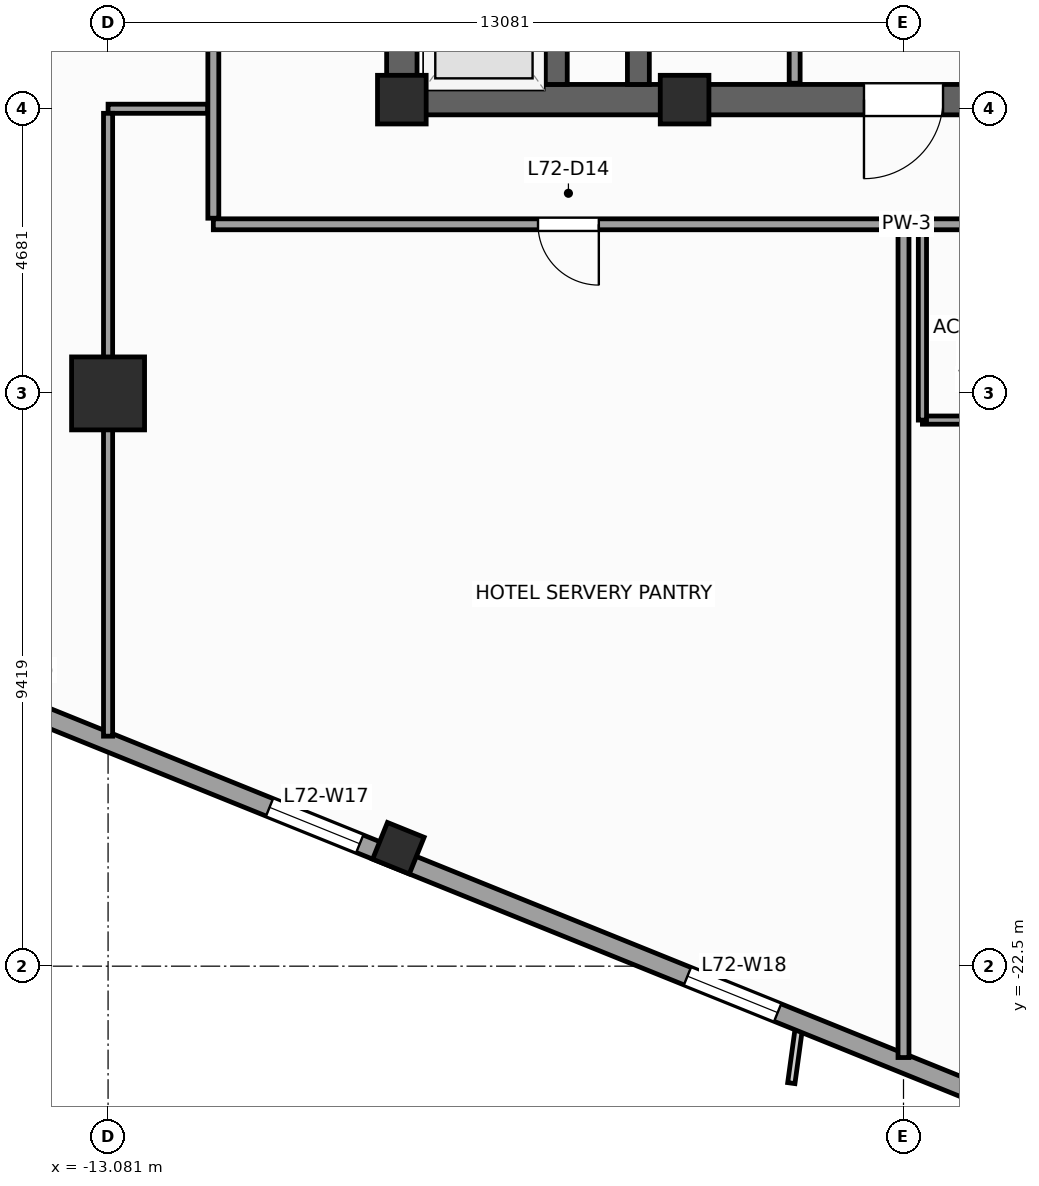
"""IFC4 building model, lengths in metres.
Left out: names, types, materials, properties, quantities, classifications, styles, units other than length and angle.
Written with IfcOpenShell. Run it as: python <this file> out.ifc"""

import sys

from ifc_helpers import new_model, si_unit, direction, frame, frame_2d, origin, origin_2d, place, context, subcontext, project, spatial, rectangle, extrude, source, transform, mapped, element, fill, save


model = new_model("IFC4")
c1 = context("Model", 3, precision=1e-05, world=origin(), true_north=direction((0.0, 1.0)))
c2 = subcontext(c1, "Body", "Model", "MODEL_VIEW")
j1 = project(units=[si_unit("LENGTHUNIT", "METRE"), si_unit("PLANEANGLEUNIT", "RADIAN")], contexts=[c1])
p1 = place(None, origin())
s1 = spatial("IfcSite", under=j1, at=p1, CompositionType="ELEMENT")
p2 = place(p1, origin())
s2 = spatial("IfcBuilding", under=s1, at=p2, CompositionType="ELEMENT")
p3 = place(p2, frame((0.0, 0.0, 294.0)))
s3 = spatial("IfcBuildingStorey", under=s2, at=p3, CompositionType="ELEMENT", Elevation=294.0)
p4 = place(p3, frame((-8.5, -8.25, 0.0), z_axis=(0.0, 0.0, 1.0), x_axis=(1.0, 0.0, 0.0)))
e1 = element("IfcWall", 1, at=p4, inside=s3, PredefinedType="SHEAR", context=c2, shape_type="SweptSolid", body=[
    extrude(rectangle(XDim=17.0, YDim=0.5, at=frame_2d((8.5, 0.0))), origin(), (0.0, 0.0, 1.0), 3.6),
])
p5 = place(p4, frame((7.85, 0.0, 0.0)))
e2 = element("IfcOpeningElement", 2, at=p5, cuts=e1, PredefinedType="OPENING", context=c2, shape_type="SweptSolid", body=[
    extrude(rectangle(XDim=1.3, YDim=2.2, at=frame_2d((0.65, 1.1))), frame((0.0, 0.26, 0.0), z_axis=(0.0, -1.0, 0.0), x_axis=(1.0, 0.0, 0.0)), (0.0, 0.0, 1.0), 0.52),
])
p6 = place(p3, frame((-8.25, -8.0, 0.0), z_axis=(0.0, 0.0, 1.0), x_axis=(0.0, 1.0, 0.0)))
e3 = element("IfcWall", 3, at=p6, inside=s3, PredefinedType="SHEAR", context=c2, shape_type="SweptSolid", body=[
    extrude(rectangle(XDim=16.0, YDim=0.5, at=frame_2d((8.0, 0.0))), origin(), (0.0, 0.0, 1.0), 3.6),
])
p7 = place(p6, frame((4.69, 0.0, 0.0)))
e4 = element("IfcOpeningElement", 4, at=p7, cuts=e3, PredefinedType="OPENING", context=c2, shape_type="SweptSolid", body=[
    extrude(rectangle(XDim=1.3, YDim=2.2, at=frame_2d((0.65, 1.1))), frame((0.0, 0.26, 0.0), z_axis=(0.0, -1.0, 0.0), x_axis=(1.0, 0.0, 0.0)), (0.0, 0.0, 1.0), 0.52),
])
p8 = place(p3, frame((-4.36, -8.0, 0.0), z_axis=(0.0, 0.0, 1.0), x_axis=(0.0, 1.0, 0.0)))
e5 = element("IfcWall", 5, at=p8, inside=s3, PredefinedType="SHEAR", context=c2, shape_type="SweptSolid", body=[
    extrude(rectangle(XDim=16.0, YDim=0.36, at=frame_2d((8.0, 0.0))), origin(), (0.0, 0.0, 1.0), 3.6),
])
p9 = place(p3, frame((-5.71, -8.0, 0.0), z_axis=(0.0, 0.0, 1.0), x_axis=(0.0, 1.0, 0.0)))
e6 = element("IfcWall", 6, at=p9, inside=s3, PredefinedType="SHEAR", context=c2, shape_type="SweptSolid", body=[
    extrude(rectangle(XDim=2.54, YDim=0.36, at=frame_2d((1.27, 0.0))), origin(), (0.0, 0.0, 1.0), 3.6),
])
m1 = source(origin(), c2, "Body", "SweptSolid", [
    extrude(rectangle(XDim=0.8, YDim=0.8, at=origin_2d()), origin(), (0.0, 0.0, 1.0), 3.6),
])
for number, where, z_axis, x_axis in (
    (7, (-8.25, -8.25, 0.0), (0.0, 0.0, 1.0), (1.0, 0.0, 0.0)),
    (8, (-3.6, -8.25, 0.0), (0.0, 0.0, 1.0), (1.0, 0.0, 0.0)),
):
    element("IfcColumn", number, at=place(p3, frame(where, z_axis=z_axis, x_axis=x_axis)), inside=s3, PredefinedType="PILASTER", context=c2, shape_type="MappedRepresentation", body=[
        mapped(m1, transform((0.0, 0.0, 0.0), scale=1.0)),
    ])
m2 = source(origin(), c2, "Body", "SweptSolid", [
    extrude(rectangle(XDim=1.2, YDim=1.2, at=origin_2d()), origin(), (0.0, 0.0, 1.0), 3.6),
])
p10 = place(p3, frame((-13.081, -13.081, 0.0), z_axis=(0.0, 0.0, 1.0), x_axis=(1.0, 0.0, 0.0)))
e9 = element("IfcColumn", 9, at=p10, inside=s3, PredefinedType="COLUMN", context=c2, shape_type="MappedRepresentation", body=[
    mapped(m2, transform((0.0, 0.0, 0.0), scale=1.0)),
])
m3 = source(origin(), c2, "Body", "SweptSolid", [
    extrude(rectangle(XDim=0.65, YDim=0.65, at=origin_2d()), origin(), (0.0, 0.0, 1.0), 3.6),
])
p11 = place(p3, frame((-8.307, -20.56, 0.0), z_axis=(0.0, 0.0, 1.0), x_axis=(0.374606593416, 0.927183854567, 0.0)))
e10 = element("IfcColumn", 10, at=p11, inside=s3, PredefinedType="COLUMN", context=c2, shape_type="MappedRepresentation", body=[
    mapped(m3, transform((0.0, 0.0, 0.0), scale=1.0)),
])
p12 = place(p3, frame((-23.813, -14.479, 0.0), z_axis=(0.0, 0.0, 1.0), x_axis=(0.927182657188, -0.374609557019, 0.0)))
e11 = element("IfcWall", 11, at=p12, inside=s3, PredefinedType="STANDARD", context=c2, shape_type="SweptSolid", body=[
    extrude(rectangle(XDim=33.31, YDim=0.31, at=frame_2d((16.655, 0.0))), origin(), (0.0, 0.0, 1.0), 2.75),
])
p13 = place(p12, frame((3.197, 0.0, 0.47)))
e12 = element("IfcOpeningElement", 12, at=p13, cuts=e11, PredefinedType="OPENING", context=c2, shape_type="SweptSolid", body=[
    extrude(rectangle(XDim=1.6, YDim=2.1, at=frame_2d((0.8, 1.05))), frame((0.0, 0.165, 0.0), z_axis=(0.0, -1.0, 0.0), x_axis=(1.0, 0.0, 0.0)), (0.0, 0.0, 1.0), 0.33),
])
p14 = place(p12, frame((8.86, 0.0, 0.47)))
e13 = element("IfcOpeningElement", 13, at=p14, cuts=e11, PredefinedType="OPENING", context=c2, shape_type="SweptSolid", body=[
    extrude(rectangle(XDim=1.6, YDim=2.1, at=frame_2d((0.8, 1.05))), frame((0.0, 0.165, 0.0), z_axis=(0.0, -1.0, 0.0), x_axis=(1.0, 0.0, 0.0)), (0.0, 0.0, 1.0), 0.33),
])
p15 = place(p12, frame((14.439, 0.0, 0.47)))
e14 = element("IfcOpeningElement", 14, at=p15, cuts=e11, PredefinedType="OPENING", context=c2, shape_type="SweptSolid", body=[
    extrude(rectangle(XDim=1.6, YDim=2.1, at=frame_2d((0.8, 1.05))), frame((0.0, 0.165, 0.0), z_axis=(0.0, -1.0, 0.0), x_axis=(1.0, 0.0, 0.0)), (0.0, 0.0, 1.0), 0.33),
])
p16 = place(p12, frame((21.851, 0.0, 0.47)))
e15 = element("IfcOpeningElement", 15, at=p16, cuts=e11, PredefinedType="OPENING", context=c2, shape_type="SweptSolid", body=[
    extrude(rectangle(XDim=1.6, YDim=2.1, at=frame_2d((0.8, 1.05))), frame((0.0, 0.165, 0.0), z_axis=(0.0, -1.0, 0.0), x_axis=(1.0, 0.0, 0.0)), (0.0, 0.0, 1.0), 0.33),
])
p17 = place(p12, frame((27.847, 0.0, 0.47)))
e16 = element("IfcOpeningElement", 16, at=p17, cuts=e11, PredefinedType="OPENING", context=c2, shape_type="SweptSolid", body=[
    extrude(rectangle(XDim=1.6, YDim=2.1, at=frame_2d((0.8, 1.05))), frame((0.0, 0.165, 0.0), z_axis=(0.0, -1.0, 0.0), x_axis=(1.0, 0.0, 0.0)), (0.0, 0.0, 1.0), 0.33),
])
p18 = place(p3, frame((-1.79, -7.98, 0.0), z_axis=(0.0, 0.0, 1.0), x_axis=(0.0, 1.0, 0.0)))
e17 = element("IfcWall", 17, at=p18, inside=s3, PredefinedType="PARTITIONING", context=c2, shape_type="SweptSolid", body=[
    extrude(rectangle(XDim=12.38, YDim=0.18, at=frame_2d((6.19, 0.0))), origin(), (0.0, 0.0, 1.0), 3.35),
])
p19 = place(p18, frame((8.8, 0.0, 0.0)))
e18 = element("IfcOpeningElement", 18, at=p19, cuts=e17, PredefinedType="OPENING", context=c2, shape_type="SweptSolid", body=[
    extrude(rectangle(XDim=1.1, YDim=2.2, at=frame_2d((0.55, 1.1))), frame((0.0, 0.1, 0.0), z_axis=(0.0, -1.0, 0.0), x_axis=(1.0, 0.0, 0.0)), (0.0, 0.0, 1.0), 0.2),
])
p20 = place(p18, frame((10.86, 0.0, 0.0)))
e19 = element("IfcOpeningElement", 19, at=p20, cuts=e17, PredefinedType="OPENING", context=c2, shape_type="SweptSolid", body=[
    extrude(rectangle(XDim=1.1, YDim=2.2, at=frame_2d((0.55, 1.1))), frame((0.0, 0.1, 0.0), z_axis=(0.0, -1.0, 0.0), x_axis=(1.0, 0.0, 0.0)), (0.0, 0.0, 1.0), 0.2),
])
p21 = place(p18, frame((1.4, 0.0, 0.0)))
e20 = element("IfcOpeningElement", 20, at=p21, cuts=e17, PredefinedType="OPENING", context=c2, shape_type="SweptSolid", body=[
    extrude(rectangle(XDim=1.15, YDim=2.25, at=frame_2d((0.575, 1.125))), frame((0.0, 0.1, 0.0), z_axis=(0.0, -1.0, 0.0), x_axis=(1.0, 0.0, 0.0)), (0.0, 0.0, 1.0), 0.2),
])
p22 = place(p18, frame((5.6, 0.0, 0.0)))
e21 = element("IfcOpeningElement", 21, at=p22, cuts=e17, PredefinedType="OPENING", context=c2, shape_type="SweptSolid", body=[
    extrude(rectangle(XDim=1.15, YDim=2.25, at=frame_2d((0.575, 1.125))), frame((0.0, 0.1, 0.0), z_axis=(0.0, -1.0, 0.0), x_axis=(1.0, 0.0, 0.0)), (0.0, 0.0, 1.0), 0.2),
])
p23 = place(p3, frame((-11.35, -10.3, 0.0), z_axis=(0.0, 0.0, 1.0), x_axis=(1.0, 0.0, 0.0)))
e22 = element("IfcWall", 22, at=p23, inside=s3, PredefinedType="PARTITIONING", context=c2, shape_type="SweptSolid", body=[
    extrude(rectangle(XDim=22.8, YDim=0.18, at=frame_2d((11.4, 0.0))), origin(), (0.0, 0.0, 1.0), 3.35),
])
p24 = place(p23, frame((12.336, 0.0, 0.0)))
e23 = element("IfcOpeningElement", 23, at=p24, cuts=e22, PredefinedType="OPENING", context=c2, shape_type="SweptSolid", body=[
    extrude(rectangle(XDim=0.95, YDim=2.1, at=frame_2d((0.475, 1.05))), frame((0.0, 0.1, 0.0), z_axis=(0.0, -1.0, 0.0), x_axis=(1.0, 0.0, 0.0)), (0.0, 0.0, 1.0), 0.2),
])
p25 = place(p23, frame((17.71, 0.0, 0.0)))
e24 = element("IfcOpeningElement", 24, at=p25, cuts=e22, PredefinedType="OPENING", context=c2, shape_type="SweptSolid", body=[
    extrude(rectangle(XDim=1.0, YDim=2.15, at=frame_2d((0.5, 1.075))), frame((0.0, 0.1, 0.0), z_axis=(0.0, -1.0, 0.0), x_axis=(1.0, 0.0, 0.0)), (0.0, 0.0, 1.0), 0.2),
])
p26 = place(p23, frame((5.339, 0.0, 0.0)))
e25 = element("IfcOpeningElement", 25, at=p26, cuts=e22, PredefinedType="OPENING", context=c2, shape_type="SweptSolid", body=[
    extrude(rectangle(XDim=1.0, YDim=2.15, at=frame_2d((0.5, 1.075))), frame((0.0, 0.1, 0.0), z_axis=(0.0, -1.0, 0.0), x_axis=(1.0, 0.0, 0.0)), (0.0, 0.0, 1.0), 0.2),
])
p27 = place(p3, frame((-11.35, -10.2, 0.0), z_axis=(0.0, 0.0, 1.0), x_axis=(0.0, 1.0, 0.0)))
e26 = element("IfcWall", 26, at=p27, inside=s3, PredefinedType="PARTITIONING", context=c2, shape_type="SweptSolid", body=[
    extrude(rectangle(XDim=22.55, YDim=0.18, at=frame_2d((11.275, 0.0))), origin(), (0.0, 0.0, 1.0), 3.35),
])
p28 = place(p27, frame((11.6, 0.0, 0.0)))
e27 = element("IfcOpeningElement", 27, at=p28, cuts=e26, PredefinedType="OPENING", context=c2, shape_type="SweptSolid", body=[
    extrude(rectangle(XDim=1.0, YDim=2.15, at=frame_2d((0.5, 1.075))), frame((0.0, 0.1, 0.0), z_axis=(0.0, -1.0, 0.0), x_axis=(1.0, 0.0, 0.0)), (0.0, 0.0, 1.0), 0.2),
])
p29 = place(p27, frame((15.8, 0.0, 0.0)))
e28 = element("IfcOpeningElement", 28, at=p29, cuts=e26, PredefinedType="OPENING", context=c2, shape_type="SweptSolid", body=[
    extrude(rectangle(XDim=1.0, YDim=2.15, at=frame_2d((0.5, 1.075))), frame((0.0, 0.1, 0.0), z_axis=(0.0, -1.0, 0.0), x_axis=(1.0, 0.0, 0.0)), (0.0, 0.0, 1.0), 0.2),
])
p30 = place(p27, frame((3.6, 0.0, 0.0)))
e29 = element("IfcOpeningElement", 29, at=p30, cuts=e26, PredefinedType="OPENING", context=c2, shape_type="SweptSolid", body=[
    extrude(rectangle(XDim=1.0, YDim=2.15, at=frame_2d((0.5, 1.075))), frame((0.0, 0.1, 0.0), z_axis=(0.0, -1.0, 0.0), x_axis=(1.0, 0.0, 0.0)), (0.0, 0.0, 1.0), 0.2),
])
p31 = place(p27, frame((7.8, 0.0, 0.0)))
e30 = element("IfcOpeningElement", 30, at=p31, cuts=e26, PredefinedType="OPENING", context=c2, shape_type="SweptSolid", body=[
    extrude(rectangle(XDim=1.0, YDim=2.15, at=frame_2d((0.5, 1.075))), frame((0.0, 0.1, 0.0), z_axis=(0.0, -1.0, 0.0), x_axis=(1.0, 0.0, 0.0)), (0.0, 0.0, 1.0), 0.2),
])
p32 = place(p3, frame((0.0, -10.395, 0.0), z_axis=(0.0, 0.0, 1.0), x_axis=(0.0, -1.0, 0.0)))
e31 = element("IfcWall", 31, at=p32, inside=s3, PredefinedType="PARTITIONING", context=c2, shape_type="SweptSolid", body=[
    extrude(rectangle(XDim=13.608, YDim=0.18, at=frame_2d((6.804, 0.0))), origin(), (0.0, 0.0, 1.0), 3.02),
])
p33 = place(p3, frame((-11.445, -8.4, 0.0), z_axis=(0.0, 0.0, 1.0), x_axis=(-1.0, 0.0, 0.0)))
e32 = element("IfcWall", 32, at=p33, inside=s3, PredefinedType="PARTITIONING", context=c2, shape_type="SweptSolid", body=[
    extrude(rectangle(XDim=1.636, YDim=0.15, at=frame_2d((0.818, 0.0))), origin(), (0.0, 0.0, 1.0), 3.35),
])
p34 = place(p3, frame((-13.081, -8.475, 0.0), z_axis=(0.0, 0.0, 1.0), x_axis=(0.0, -1.0, 0.0)))
e33 = element("IfcWall", 33, at=p34, inside=s3, PredefinedType="PARTITIONING", context=c2, shape_type="SweptSolid", body=[
    extrude(rectangle(XDim=10.243, YDim=0.15, at=frame_2d((5.121, 0.0))), origin(), (0.0, 0.0, 1.0), 2.45),
])
p35 = place(p3, frame((0.311, -13.52, 0.0), z_axis=(0.0, 0.0, 1.0), x_axis=(1.0, 0.0, 0.0)))
e34 = element("IfcWall", 34, at=p35, inside=s3, PredefinedType="PARTITIONING", context=c2, shape_type="SweptSolid", body=[
    extrude(rectangle(XDim=2.3, YDim=0.135, at=frame_2d((1.15, 0.0))), origin(), (0.0, 0.0, 1.0), 3.35),
])
p36 = place(p3, frame((0.311, -13.52, 0.0), z_axis=(0.0, 0.0, 1.0), x_axis=(0.0, 1.0, 0.0)))
e35 = element("IfcWall", 35, at=p36, inside=s3, PredefinedType="PARTITIONING", context=c2, shape_type="SweptSolid", body=[
    extrude(rectangle(XDim=3.2, YDim=0.135, at=frame_2d((1.6, 0.0))), origin(), (0.0, 0.0, 1.0), 3.35),
])
m4 = source(origin(), c2, "Body", "SweptSolid", [
    extrude(rectangle(XDim=1.6, YDim=2.1, at=frame_2d((0.8, 1.05))), frame((0.0, 0.03, 0.0), z_axis=(0.0, -1.0, 0.0), x_axis=(1.0, 0.0, 0.0)), (0.0, 0.0, 1.0), 0.06),
])
p37 = place(p15, origin())
e36 = element("IfcWindow", 36, at=p37, inside=s3, PartitioningType="SINGLE_PANEL", PredefinedType="WINDOW", context=c2, shape_type="MappedRepresentation", body=[
    mapped(m4, transform((0.0, 0.0, 0.0), scale=1.0)),
])
fill(e14, e36)
p38 = place(p16, origin())
e37 = element("IfcWindow", 37, at=p38, inside=s3, PartitioningType="SINGLE_PANEL", PredefinedType="WINDOW", context=c2, shape_type="MappedRepresentation", body=[
    mapped(m4, transform((0.0, 0.0, 0.0), scale=1.0)),
])
fill(e15, e37)
m5 = source(origin(), c2, "Body", "SweptSolid", [
    extrude(rectangle(XDim=1.3, YDim=2.2, at=frame_2d((0.65, 1.1))), frame((0.0, 0.025, 0.0), z_axis=(0.0, -1.0, 0.0), x_axis=(1.0, 0.0, 0.0)), (0.0, 0.0, 1.0), 0.05),
])
p39 = place(p5, frame((1.3, 0.0, 0.0), z_axis=(0.0, 0.0, 1.0), x_axis=(-1.0, 0.0, 0.0)))
e38 = element("IfcDoor", 38, at=p39, inside=s3, OperationType="SINGLE_SWING_LEFT", PredefinedType="DOOR", context=c2, shape_type="MappedRepresentation", body=[
    mapped(m5, transform((0.0, 0.0, 0.0), scale=1.0)),
])
fill(e2, e38)
m6 = source(origin(), c2, "Body", "SweptSolid", [
    extrude(rectangle(XDim=1.0, YDim=2.15, at=frame_2d((0.5, 1.075))), frame((0.0, 0.025, 0.0), z_axis=(0.0, -1.0, 0.0), x_axis=(1.0, 0.0, 0.0)), (0.0, 0.0, 1.0), 0.05),
])
p40 = place(p26, frame((1.0, 0.0, 0.0), z_axis=(0.0, 0.0, 1.0), x_axis=(-1.0, 0.0, 0.0)))
e39 = element("IfcDoor", 39, at=p40, inside=s3, OperationType="SINGLE_SWING_RIGHT", PredefinedType="DOOR", context=c2, shape_type="MappedRepresentation", body=[
    mapped(m6, transform((0.0, 0.0, 0.0), scale=1.0)),
])
fill(e25, e39)
save(model, sys.argv[1])
